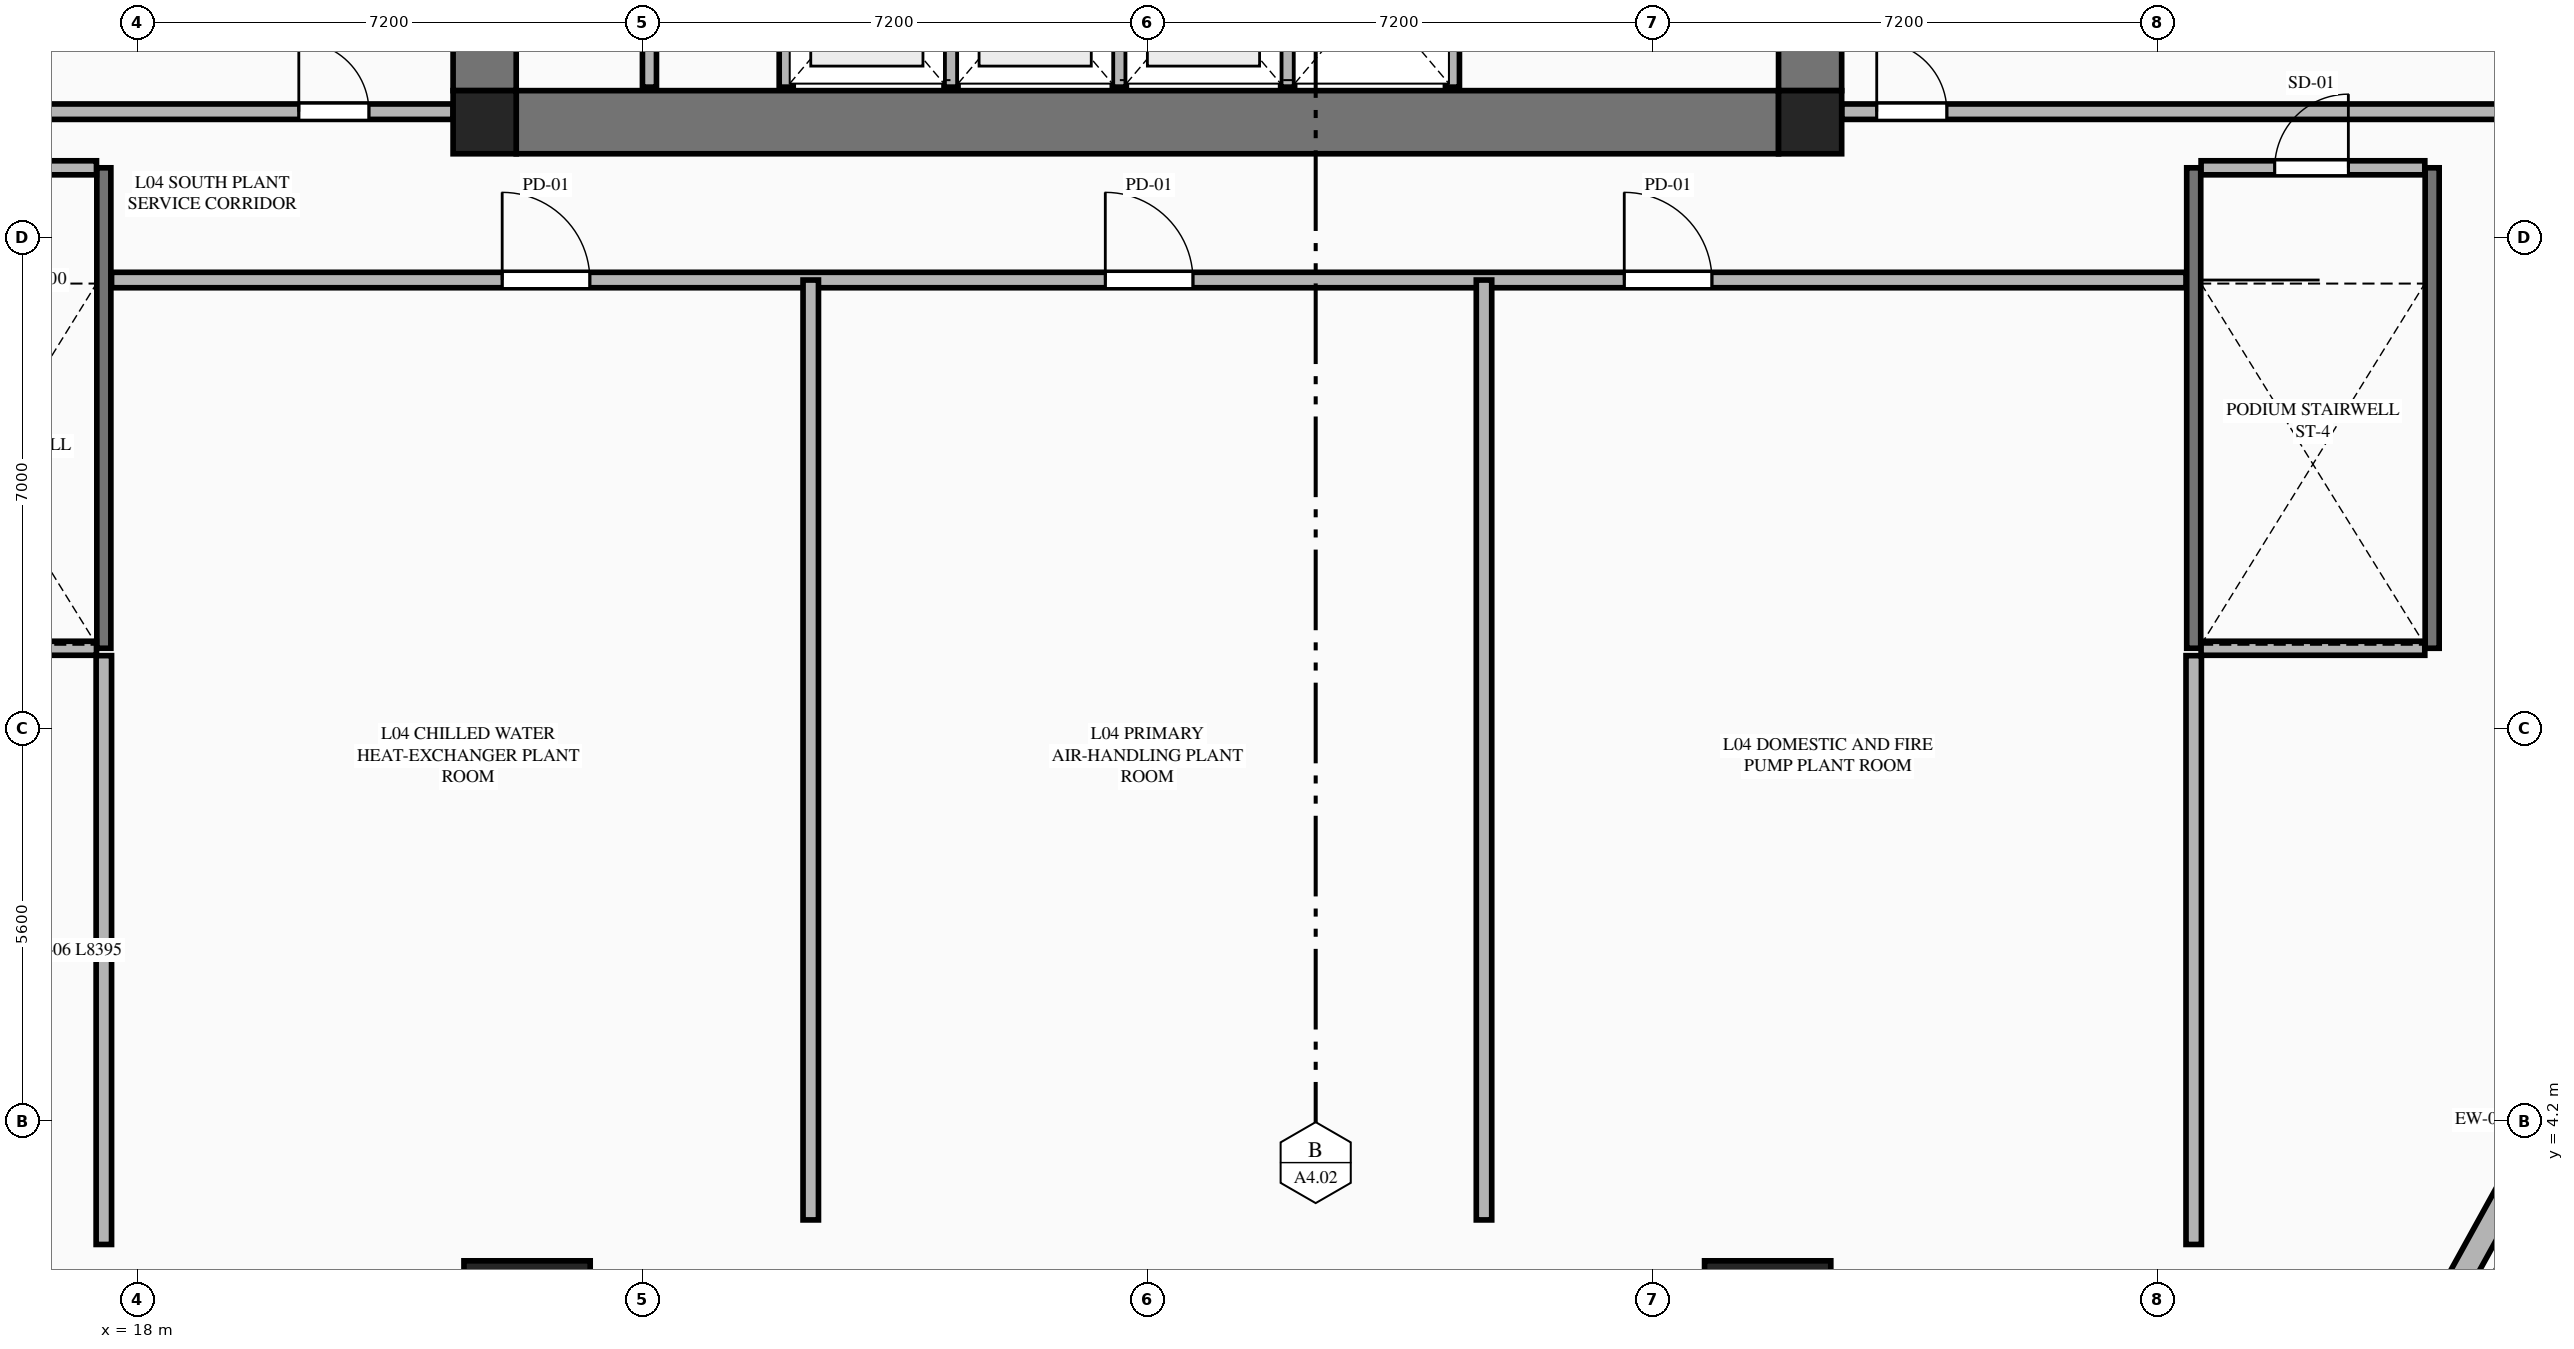
"""IFC4 building model, lengths in metres.
Left out: names, types, materials, properties, quantities, classifications, styles, units other than length and angle.
Written with IfcOpenShell. Run it as: python <this file> out.ifc"""

import sys

from ifc_helpers import new_model, si_unit, direction, frame, frame_2d, origin, origin_2d, place, context, subcontext, project, spatial, rectangle, extrude, element, fill, save


model = new_model("IFC4")
c1 = context("Model", 3, precision=1e-05, world=origin(), true_north=direction((0.0, 1.0)))
c2 = subcontext(c1, "Body", "Model", "MODEL_VIEW")
j1 = project(units=[si_unit("LENGTHUNIT", "METRE"), si_unit("PLANEANGLEUNIT", "RADIAN")], contexts=[c1])
p1 = place(None, origin())
s1 = spatial("IfcSite", under=j1, at=p1, CompositionType="ELEMENT")
p2 = place(p1, origin())
s2 = spatial("IfcBuilding", under=s1, at=p2, CompositionType="ELEMENT")
p3 = place(p2, frame((0.0, 0.0, 19.5)))
s3 = spatial("IfcBuildingStorey", under=s2, at=p3, CompositionType="ELEMENT", Elevation=19.5)
for number, where, z_axis, x_axis in (
    (1, (22.95, 18.45, 0.0), (0.0, 0.0, 1.0), (1.0, 0.0, 0.0)),
    (2, (41.85, 18.45, 0.0), (0.0, 0.0, 1.0), (1.0, 0.0, 0.0)),
):
    element("IfcColumn", number, at=place(p3, frame(where, z_axis=z_axis, x_axis=x_axis)), inside=s3, PredefinedType="COLUMN", context=c2, shape_type="SweptSolid", body=[
        extrude(rectangle(XDim=0.9, YDim=0.9, at=origin_2d()), origin(), (0.0, 0.0, 1.0), 5.4),
    ])
p4 = place(p3, frame((23.4, 18.45, 0.0), z_axis=(0.0, 0.0, 1.0), x_axis=(1.0, 0.0, 0.0)))
e3 = element("IfcWall", 3, at=p4, inside=s3, PredefinedType="SHEAR", context=c2, shape_type="SweptSolid", body=[
    extrude(rectangle(XDim=18.0, YDim=0.9, at=frame_2d((9.0, 0.0))), origin(), (0.0, 0.0, 1.0), 5.18),
])
p5 = place(p3, frame((22.95, 18.9, 0.0), z_axis=(0.0, 0.0, 1.0), x_axis=(0.0, 1.0, 0.0)))
e4 = element("IfcWall", 4, at=p5, inside=s3, PredefinedType="SHEAR", context=c2, shape_type="SweptSolid", body=[
    extrude(rectangle(XDim=14.0, YDim=0.9, at=frame_2d((7.0, 0.0))), origin(), (0.0, 0.0, 1.0), 5.18),
])
p6 = place(p5, frame((2.94, 0.0, 0.0)))
e5 = element("IfcOpeningElement", 5, at=p6, cuts=e4, PredefinedType="OPENING", context=c2, shape_type="SweptSolid", body=[
    extrude(rectangle(XDim=1.22, YDim=2.25, at=frame_2d((0.61, 1.125))), frame((0.0, 0.46, 0.0), z_axis=(0.0, -1.0, 0.0), x_axis=(1.0, 0.0, 0.0)), (0.0, 0.0, 1.0), 0.92),
])
p7 = place(p3, frame((41.85, 18.9, 0.0), z_axis=(0.0, 0.0, 1.0), x_axis=(0.0, 1.0, 0.0)))
e6 = element("IfcWall", 6, at=p7, inside=s3, PredefinedType="SHEAR", context=c2, shape_type="SweptSolid", body=[
    extrude(rectangle(XDim=14.0, YDim=0.9, at=frame_2d((7.0, 0.0))), origin(), (0.0, 0.0, 1.0), 5.18),
])
p8 = place(p7, frame((2.94, 0.0, 0.0)))
e7 = element("IfcOpeningElement", 7, at=p8, cuts=e6, PredefinedType="OPENING", context=c2, shape_type="SweptSolid", body=[
    extrude(rectangle(XDim=1.22, YDim=2.25, at=frame_2d((0.61, 1.125))), frame((0.0, 0.46, 0.0), z_axis=(0.0, -1.0, 0.0), x_axis=(1.0, 0.0, 0.0)), (0.0, 0.0, 1.0), 0.92),
])
for number, where, z_axis, x_axis in (
    (8, (23.555, 1.317, 0.0), (0.0, 0.0, 1.0), (1.0, 0.0, 0.0)),
    (9, (41.245, 1.317, 0.0), (0.0, 0.0, 1.0), (1.0, 0.0, 0.0)),
):
    element("IfcColumn", number, at=place(p3, frame(where, z_axis=z_axis, x_axis=x_axis)), inside=s3, PredefinedType="COLUMN", context=c2, shape_type="SweptSolid", body=[
        extrude(rectangle(XDim=1.8, YDim=1.8, at=origin_2d()), origin(), (0.0, 0.0, 1.0), 5.4),
    ])
for number, where, z_axis, x_axis in (
    (10, (27.25, 18.95, 0.0), (0.0, 0.0, 1.0), (0.0, 1.0, 0.0)),
    (11, (29.6, 18.95, 0.0), (0.0, 0.0, 1.0), (0.0, 1.0, 0.0)),
    (12, (32.0, 18.95, 0.0), (0.0, 0.0, 1.0), (0.0, 1.0, 0.0)),
    (13, (34.4, 18.95, 0.0), (0.0, 0.0, 1.0), (0.0, 1.0, 0.0)),
    (14, (36.75, 18.95, 0.0), (0.0, 0.0, 1.0), (0.0, 1.0, 0.0)),
    (15, (25.3, 18.95, 0.0), (0.0, 0.0, 1.0), (0.0, 1.0, 0.0)),
):
    element("IfcWall", number, at=place(p3, frame(where, z_axis=z_axis, x_axis=x_axis)), inside=s3, PredefinedType="PLUMBINGWALL", context=c2, shape_type="SweptSolid", body=[
        extrude(rectangle(XDim=2.73, YDim=0.2, at=frame_2d((1.365, 0.0))), origin(), (0.0, 0.0, 1.0), 5.18),
    ])
p9 = place(p3, frame((17.52, 10.95, 0.0), z_axis=(0.0, 0.0, 1.0), x_axis=(0.0, 1.0, 0.0)))
e16 = element("IfcWall", 16, at=p9, inside=s3, PredefinedType="SHEAR", context=c2, shape_type="SweptSolid", body=[
    extrude(rectangle(XDim=6.85, YDim=0.2, at=frame_2d((3.425, 0.0))), origin(), (0.0, 0.0, 1.0), 5.4),
])
p10 = place(p3, frame((14.225, 10.95, 0.0), z_axis=(0.0, 0.0, 1.0), x_axis=(1.0, 0.0, 0.0)))
e17 = element("IfcWall", 17, at=p10, inside=s3, PredefinedType="PLUMBINGWALL", context=c2, shape_type="SweptSolid", body=[
    extrude(rectangle(XDim=3.19, YDim=0.2, at=frame_2d((1.595, 0.0))), origin(), (0.0, 0.0, 1.0), 5.18),
])
p11 = place(p3, frame((14.225, 17.8, 0.0), z_axis=(0.0, 0.0, 1.0), x_axis=(1.0, 0.0, 0.0)))
e18 = element("IfcWall", 18, at=p11, inside=s3, PredefinedType="PLUMBINGWALL", context=c2, shape_type="SweptSolid", body=[
    extrude(rectangle(XDim=3.19, YDim=0.2, at=frame_2d((1.595, 0.0))), origin(), (0.0, 0.0, 1.0), 3.79),
])
p12 = place(p11, frame((1.05, 0.0, 0.0)))
e19 = element("IfcOpeningElement", 19, at=p12, cuts=e18, PredefinedType="OPENING", context=c2, shape_type="SweptSolid", body=[
    extrude(rectangle(XDim=1.05, YDim=2.15, at=frame_2d((0.525, 1.075))), frame((0.0, 0.11, 0.0), z_axis=(0.0, -1.0, 0.0), x_axis=(1.0, 0.0, 0.0)), (0.0, 0.0, 1.0), 0.22),
])
for number, where, z_axis, x_axis in (
    (20, (47.32, 10.95, 0.0), (0.0, 0.0, 1.0), (0.0, 1.0, 0.0)),
    (21, (50.72, 10.95, 0.0), (0.0, 0.0, 1.0), (0.0, 1.0, 0.0)),
):
    element("IfcWall", number, at=place(p3, frame(where, z_axis=z_axis, x_axis=x_axis)), inside=s3, PredefinedType="SHEAR", context=c2, shape_type="SweptSolid", body=[
        extrude(rectangle(XDim=6.85, YDim=0.2, at=frame_2d((3.425, 0.0))), origin(), (0.0, 0.0, 1.0), 5.4),
    ])
p13 = place(p3, frame((47.425, 10.95, 0.0), z_axis=(0.0, 0.0, 1.0), x_axis=(1.0, 0.0, 0.0)))
e22 = element("IfcWall", 22, at=p13, inside=s3, PredefinedType="PLUMBINGWALL", context=c2, shape_type="SweptSolid", body=[
    extrude(rectangle(XDim=3.19, YDim=0.2, at=frame_2d((1.595, 0.0))), origin(), (0.0, 0.0, 1.0), 5.18),
])
p14 = place(p3, frame((47.425, 17.8, 0.0), z_axis=(0.0, 0.0, 1.0), x_axis=(1.0, 0.0, 0.0)))
e23 = element("IfcWall", 23, at=p14, inside=s3, PredefinedType="PLUMBINGWALL", context=c2, shape_type="SweptSolid", body=[
    extrude(rectangle(XDim=3.19, YDim=0.2, at=frame_2d((1.595, 0.0))), origin(), (0.0, 0.0, 1.0), 3.79),
])
p15 = place(p14, frame((1.05, 0.0, 0.0)))
e24 = element("IfcOpeningElement", 24, at=p15, cuts=e23, PredefinedType="OPENING", context=c2, shape_type="SweptSolid", body=[
    extrude(rectangle(XDim=1.05, YDim=2.15, at=frame_2d((0.525, 1.075))), frame((0.0, 0.11, 0.0), z_axis=(0.0, -1.0, 0.0), x_axis=(1.0, 0.0, 0.0)), (0.0, 0.0, 1.0), 0.22),
])
p16 = place(p3, frame((6.925, 18.6, 0.0), z_axis=(0.0, 0.0, 1.0), x_axis=(1.0, 0.0, 0.0)))
e25 = element("IfcWall", 25, at=p16, inside=s3, PredefinedType="PARTITIONING", context=c2, shape_type="SweptSolid", body=[
    extrude(rectangle(XDim=15.575, YDim=0.22, at=frame_2d((7.788, 0.0))), origin(), (0.0, 0.0, 1.0), 3.79),
])
p17 = place(p16, frame((13.375, 0.0, 0.0)))
e26 = element("IfcOpeningElement", 26, at=p17, cuts=e25, PredefinedType="OPENING", context=c2, shape_type="SweptSolid", body=[
    extrude(rectangle(XDim=1.0, YDim=2.15, at=frame_2d((0.5, 1.075))), frame((0.0, 0.12, 0.0), z_axis=(0.0, -1.0, 0.0), x_axis=(1.0, 0.0, 0.0)), (0.0, 0.0, 1.0), 0.24),
])
p18 = place(p3, frame((42.3, 18.6, 0.0), z_axis=(0.0, 0.0, 1.0), x_axis=(1.0, 0.0, 0.0)))
e27 = element("IfcWall", 27, at=p18, inside=s3, PredefinedType="PARTITIONING", context=c2, shape_type="SweptSolid", body=[
    extrude(rectangle(XDim=15.575, YDim=0.22, at=frame_2d((7.788, 0.0))), origin(), (0.0, 0.0, 1.0), 3.79),
])
p19 = place(p18, frame((0.5, 0.0, 0.0)))
e28 = element("IfcOpeningElement", 28, at=p19, cuts=e27, PredefinedType="OPENING", context=c2, shape_type="SweptSolid", body=[
    extrude(rectangle(XDim=1.0, YDim=2.15, at=frame_2d((0.5, 1.075))), frame((0.0, 0.12, 0.0), z_axis=(0.0, -1.0, 0.0), x_axis=(1.0, 0.0, 0.0)), (0.0, 0.0, 1.0), 0.24),
])
p20 = place(p3, frame((17.63, 16.2, 0.0), z_axis=(0.0, 0.0, 1.0), x_axis=(1.0, 0.0, 0.0)))
e29 = element("IfcWall", 29, at=p20, inside=s3, PredefinedType="PARTITIONING", context=c2, shape_type="SweptSolid", body=[
    extrude(rectangle(XDim=29.58, YDim=0.22, at=frame_2d((14.79, 0.0))), origin(), (0.0, 0.0, 1.0), 5.18),
])
p21 = place(p20, frame((5.57, 0.0, 0.0)))
e30 = element("IfcOpeningElement", 30, at=p21, cuts=e29, PredefinedType="OPENING", context=c2, shape_type="SweptSolid", body=[
    extrude(rectangle(XDim=1.25, YDim=2.25, at=frame_2d((0.625, 1.125))), frame((0.0, 0.12, 0.0), z_axis=(0.0, -1.0, 0.0), x_axis=(1.0, 0.0, 0.0)), (0.0, 0.0, 1.0), 0.24),
])
p22 = place(p20, frame((14.17, 0.0, 0.0)))
e31 = element("IfcOpeningElement", 31, at=p22, cuts=e29, PredefinedType="OPENING", context=c2, shape_type="SweptSolid", body=[
    extrude(rectangle(XDim=1.25, YDim=2.25, at=frame_2d((0.625, 1.125))), frame((0.0, 0.12, 0.0), z_axis=(0.0, -1.0, 0.0), x_axis=(1.0, 0.0, 0.0)), (0.0, 0.0, 1.0), 0.24),
])
p23 = place(p20, frame((21.57, 0.0, 0.0)))
e32 = element("IfcOpeningElement", 32, at=p23, cuts=e29, PredefinedType="OPENING", context=c2, shape_type="SweptSolid", body=[
    extrude(rectangle(XDim=1.25, YDim=2.25, at=frame_2d((0.625, 1.125))), frame((0.0, 0.12, 0.0), z_axis=(0.0, -1.0, 0.0), x_axis=(1.0, 0.0, 0.0)), (0.0, 0.0, 1.0), 0.24),
])
p24 = place(p3, frame((17.52, 2.45, 0.0), z_axis=(0.0, 0.0, 1.0), x_axis=(0.0, 1.0, 0.0)))
e33 = element("IfcWall", 33, at=p24, inside=s3, PredefinedType="PARTITIONING", context=c2, shape_type="SweptSolid", body=[
    extrude(rectangle(XDim=8.395, YDim=0.22, at=frame_2d((4.198, 0.0))), origin(), (0.0, 0.0, 1.0), 3.79),
])
p25 = place(p3, frame((47.32, 2.45, 0.0), z_axis=(0.0, 0.0, 1.0), x_axis=(0.0, 1.0, 0.0)))
e34 = element("IfcWall", 34, at=p25, inside=s3, PredefinedType="PARTITIONING", context=c2, shape_type="SweptSolid", body=[
    extrude(rectangle(XDim=8.395, YDim=0.22, at=frame_2d((4.198, 0.0))), origin(), (0.0, 0.0, 1.0), 5.18),
])
for number, where, z_axis, x_axis in (
    (35, (27.6, 2.8, 0.0), (0.0, 0.0, 1.0), (0.0, 1.0, 0.0)),
    (36, (37.2, 2.8, 0.0), (0.0, 0.0, 1.0), (0.0, 1.0, 0.0)),
):
    element("IfcWall", number, at=place(p3, frame(where, z_axis=z_axis, x_axis=x_axis)), inside=s3, PredefinedType="PARTITIONING", context=c2, shape_type="SweptSolid", body=[
        extrude(rectangle(XDim=13.4, YDim=0.22, at=frame_2d((6.7, 0.0))), origin(), (0.0, 0.0, 1.0), 5.18),
    ])
p26 = place(p3, frame((50.918, 1.588, 0.0), z_axis=(0.0, 0.0, 1.0), x_axis=(0.483642718265, 0.875265514612, 0.0)))
e37 = element("IfcWall", 37, at=p26, inside=s3, PredefinedType="STANDARD", context=c2, shape_type="SweptSolid", body=[
    extrude(rectangle(XDim=5.444, YDim=0.36, at=frame_2d((2.722, 0.0))), origin(), (0.0, 0.0, 1.0), 5.18),
])
p27 = place(p15, origin())
e38 = element("IfcDoor", 38, at=p27, inside=s3, OperationType="SINGLE_SWING_RIGHT", PredefinedType="DOOR", context=c2, shape_type="SweptSolid", body=[
    extrude(rectangle(XDim=1.05, YDim=2.15, at=frame_2d((0.525, 1.075))), frame((0.0, 0.025, 0.0), z_axis=(0.0, -1.0, 0.0), x_axis=(1.0, 0.0, 0.0)), (0.0, 0.0, 1.0), 0.05),
])
fill(e24, e38)
p28 = place(p17, origin())
e39 = element("IfcDoor", 39, at=p28, inside=s3, OperationType="SINGLE_SWING_LEFT", PredefinedType="DOOR", context=c2, shape_type="SweptSolid", body=[
    extrude(rectangle(XDim=1.0, YDim=2.15, at=frame_2d((0.5, 1.075))), frame((0.0, 0.025, 0.0), z_axis=(0.0, -1.0, 0.0), x_axis=(1.0, 0.0, 0.0)), (0.0, 0.0, 1.0), 0.05),
])
fill(e26, e39)
p29 = place(p19, origin())
e40 = element("IfcDoor", 40, at=p29, inside=s3, OperationType="SINGLE_SWING_LEFT", PredefinedType="DOOR", context=c2, shape_type="SweptSolid", body=[
    extrude(rectangle(XDim=1.0, YDim=2.15, at=frame_2d((0.5, 1.075))), frame((0.0, 0.025, 0.0), z_axis=(0.0, -1.0, 0.0), x_axis=(1.0, 0.0, 0.0)), (0.0, 0.0, 1.0), 0.05),
])
fill(e28, e40)
p30 = place(p21, origin())
e41 = element("IfcDoor", 41, at=p30, inside=s3, OperationType="SINGLE_SWING_LEFT", PredefinedType="DOOR", context=c2, shape_type="SweptSolid", body=[
    extrude(rectangle(XDim=1.25, YDim=2.25, at=frame_2d((0.625, 1.125))), frame((0.0, 0.025, 0.0), z_axis=(0.0, -1.0, 0.0), x_axis=(1.0, 0.0, 0.0)), (0.0, 0.0, 1.0), 0.05),
])
fill(e30, e41)
p31 = place(p22, origin())
e42 = element("IfcDoor", 42, at=p31, inside=s3, OperationType="SINGLE_SWING_LEFT", PredefinedType="DOOR", context=c2, shape_type="SweptSolid", body=[
    extrude(rectangle(XDim=1.25, YDim=2.25, at=frame_2d((0.625, 1.125))), frame((0.0, 0.025, 0.0), z_axis=(0.0, -1.0, 0.0), x_axis=(1.0, 0.0, 0.0)), (0.0, 0.0, 1.0), 0.05),
])
fill(e31, e42)
p32 = place(p23, origin())
e43 = element("IfcDoor", 43, at=p32, inside=s3, OperationType="SINGLE_SWING_LEFT", PredefinedType="DOOR", context=c2, shape_type="SweptSolid", body=[
    extrude(rectangle(XDim=1.25, YDim=2.25, at=frame_2d((0.625, 1.125))), frame((0.0, 0.025, 0.0), z_axis=(0.0, -1.0, 0.0), x_axis=(1.0, 0.0, 0.0)), (0.0, 0.0, 1.0), 0.05),
])
fill(e32, e43)
save(model, sys.argv[1])
